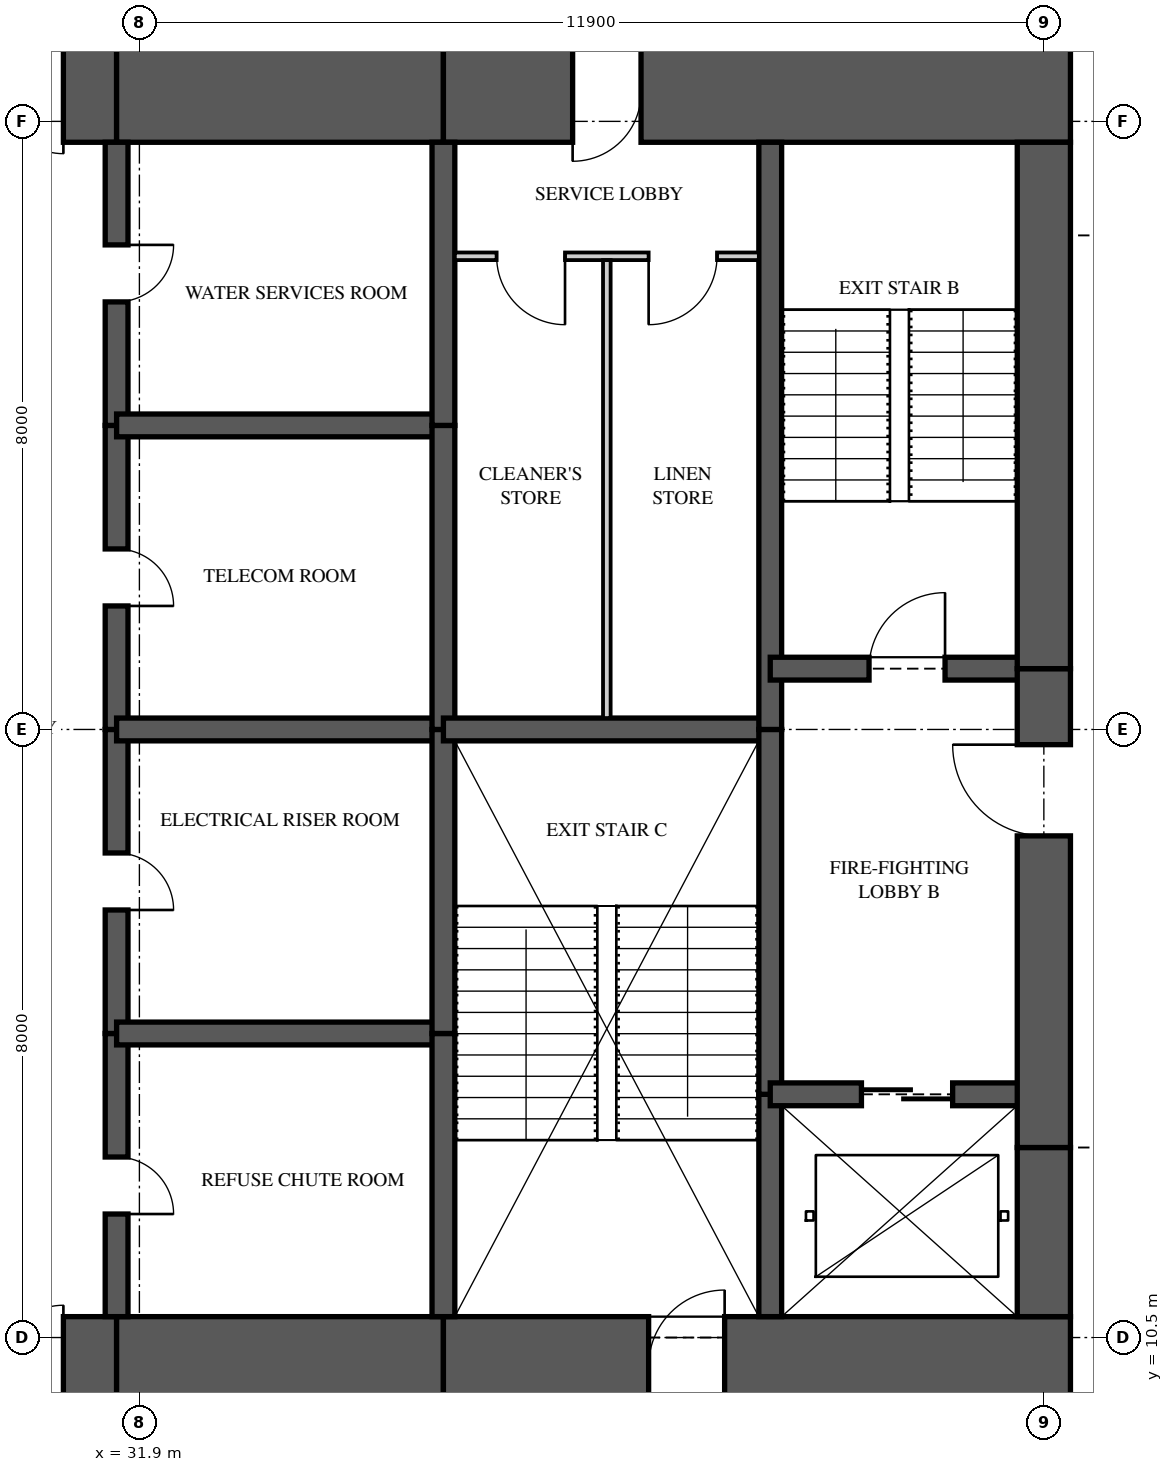
"""IFC4 building model, lengths in metres.
Left out: names, types, materials, properties, quantities, classifications, styles, units other than length and angle.
Written with IfcOpenShell. Run it as: python <this file> out.ifc"""

import sys

from ifc_helpers import new_model, si_unit, direction, frame, frame_2d, origin, place, context, subcontext, project, spatial, rectangle, extrude, element, fill, save


model = new_model("IFC4")
c1 = context("Model", 3, precision=1e-05, world=origin(), true_north=direction((0.0, 1.0)))
c2 = subcontext(c1, "Body", "Model", "MODEL_VIEW")
j1 = project(units=[si_unit("LENGTHUNIT", "METRE"), si_unit("PLANEANGLEUNIT", "RADIAN")], contexts=[c1])
p1 = place(None, origin())
s1 = spatial("IfcSite", under=j1, at=p1, CompositionType="ELEMENT")
p2 = place(p1, origin())
s2 = spatial("IfcBuilding", under=s1, at=p2, CompositionType="ELEMENT")
p3 = place(p2, frame((0.0, 0.0, 181.15)))
s3 = spatial("IfcBuildingStorey", under=s2, at=p3, CompositionType="ELEMENT", Elevation=181.15)
p4 = place(p3, frame((26.0, 10.125, 0.0), z_axis=(0.0, 0.0, 1.0), x_axis=(1.0, 0.0, 0.0)))
e1 = element("IfcWall", 1, at=p4, inside=s3, PredefinedType="SHEAR", context=c2, shape_type="SweptSolid", body=[
    extrude(rectangle(XDim=5.6, YDim=1.3, at=frame_2d((2.8, 0.0))), origin(), (0.0, 0.0, 1.0), 3.35),
])
p5 = place(p4, frame((3.3, 0.0, 0.0)))
e2 = element("IfcOpeningElement", 2, at=p5, cuts=e1, PredefinedType="OPENING", context=c2, shape_type="SweptSolid", body=[
    extrude(rectangle(XDim=1.6, YDim=2.1, at=frame_2d((0.8, 1.05))), frame((0.0, 0.66, 0.0), z_axis=(0.0, -1.0, 0.0), x_axis=(1.0, 0.0, 0.0)), (0.0, 0.0, 1.0), 1.32),
])
p6 = place(p3, frame((31.6, 10.125, 0.0), z_axis=(0.0, 0.0, 1.0), x_axis=(1.0, 0.0, 0.0)))
e3 = element("IfcWall", 3, at=p6, inside=s3, PredefinedType="SHEAR", context=c2, shape_type="SweptSolid", body=[
    extrude(rectangle(XDim=4.3, YDim=1.3, at=frame_2d((2.15, 0.0))), origin(), (0.0, 0.0, 1.0), 3.35),
])
p7 = place(p3, frame((35.9, 10.125, 0.0), z_axis=(0.0, 0.0, 1.0), x_axis=(1.0, 0.0, 0.0)))
e4 = element("IfcWall", 4, at=p7, inside=s3, PredefinedType="SHEAR", context=c2, shape_type="SweptSolid", body=[
    extrude(rectangle(XDim=8.25, YDim=1.3, at=frame_2d((4.125, 0.0))), origin(), (0.0, 0.0, 1.0), 3.35),
])
p8 = place(p7, frame((2.7, 0.0, 0.0)))
e5 = element("IfcOpeningElement", 5, at=p8, cuts=e4, PredefinedType="OPENING", context=c2, shape_type="SweptSolid", body=[
    extrude(rectangle(XDim=1.0, YDim=2.1, at=frame_2d((0.5, 1.05))), frame((0.0, 0.66, 0.0), z_axis=(0.0, -1.0, 0.0), x_axis=(1.0, 0.0, 0.0)), (0.0, 0.0, 1.0), 1.32),
])
p9 = place(p3, frame((44.15, 26.875, 0.0), z_axis=(0.0, 0.0, 1.0), x_axis=(-1.0, 0.0, 0.0)))
e6 = element("IfcWall", 6, at=p9, inside=s3, PredefinedType="SHEAR", context=c2, shape_type="SweptSolid", body=[
    extrude(rectangle(XDim=8.25, YDim=1.3, at=frame_2d((4.125, 0.0))), origin(), (0.0, 0.0, 1.0), 3.35),
])
p10 = place(p9, frame((5.65, 0.0, 0.0)))
e7 = element("IfcOpeningElement", 7, at=p10, cuts=e6, PredefinedType="OPENING", context=c2, shape_type="SweptSolid", body=[
    extrude(rectangle(XDim=0.9, YDim=2.1, at=frame_2d((0.45, 1.05))), frame((0.0, 0.66, 0.0), z_axis=(0.0, -1.0, 0.0), x_axis=(1.0, 0.0, 0.0)), (0.0, 0.0, 1.0), 1.32),
])
p11 = place(p3, frame((35.9, 26.875, 0.0), z_axis=(0.0, 0.0, 1.0), x_axis=(-1.0, 0.0, 0.0)))
e8 = element("IfcWall", 8, at=p11, inside=s3, PredefinedType="SHEAR", context=c2, shape_type="SweptSolid", body=[
    extrude(rectangle(XDim=4.3, YDim=1.3, at=frame_2d((2.15, 0.0))), origin(), (0.0, 0.0, 1.0), 3.35),
])
p12 = place(p3, frame((31.6, 26.875, 0.0), z_axis=(0.0, 0.0, 1.0), x_axis=(-1.0, 0.0, 0.0)))
e9 = element("IfcWall", 9, at=p12, inside=s3, PredefinedType="SHEAR", context=c2, shape_type="SweptSolid", body=[
    extrude(rectangle(XDim=5.6, YDim=1.3, at=frame_2d((2.8, 0.0))), origin(), (0.0, 0.0, 1.0), 3.35),
])
p13 = place(p12, frame((0.7, 0.0, 0.0)))
e10 = element("IfcOpeningElement", 10, at=p13, cuts=e9, PredefinedType="OPENING", context=c2, shape_type="SweptSolid", body=[
    extrude(rectangle(XDim=1.6, YDim=2.1, at=frame_2d((0.8, 1.05))), frame((0.0, 0.66, 0.0), z_axis=(0.0, -1.0, 0.0), x_axis=(1.0, 0.0, 0.0)), (0.0, 0.0, 1.0), 1.32),
])
p14 = place(p3, frame((43.8, 10.775, 0.0), z_axis=(0.0, 0.0, 1.0), x_axis=(0.0, 1.0, 0.0)))
e11 = element("IfcWall", 11, at=p14, inside=s3, PredefinedType="SHEAR", context=c2, shape_type="SweptSolid", body=[
    extrude(rectangle(XDim=2.225, YDim=0.7, at=frame_2d((1.113, 0.0))), origin(), (0.0, 0.0, 1.0), 3.35),
])
p15 = place(p3, frame((43.8, 13.0, 0.0), z_axis=(0.0, 0.0, 1.0), x_axis=(0.0, 1.0, 0.0)))
e12 = element("IfcWall", 12, at=p15, inside=s3, PredefinedType="SHEAR", context=c2, shape_type="SweptSolid", body=[
    extrude(rectangle(XDim=6.3, YDim=0.7, at=frame_2d((3.15, 0.0))), origin(), (0.0, 0.0, 1.0), 3.35),
])
p16 = place(p15, frame((4.1, 0.0, 0.0)))
e13 = element("IfcOpeningElement", 13, at=p16, cuts=e12, PredefinedType="OPENING", context=c2, shape_type="SweptSolid", body=[
    extrude(rectangle(XDim=1.2, YDim=2.2, at=frame_2d((0.6, 1.1))), frame((0.0, 0.36, 0.0), z_axis=(0.0, -1.0, 0.0), x_axis=(1.0, 0.0, 0.0)), (0.0, 0.0, 1.0), 0.72),
])
p17 = place(p3, frame((43.8, 19.3, 0.0), z_axis=(0.0, 0.0, 1.0), x_axis=(0.0, 1.0, 0.0)))
e14 = element("IfcWall", 14, at=p17, inside=s3, PredefinedType="SHEAR", context=c2, shape_type="SweptSolid", body=[
    extrude(rectangle(XDim=6.925, YDim=0.7, at=frame_2d((3.462, 0.0))), origin(), (0.0, 0.0, 1.0), 3.35),
])
p18 = place(p3, frame((31.6, 10.775, 0.0), z_axis=(0.0, 0.0, 1.0), x_axis=(0.0, 1.0, 0.0)))
e15 = element("IfcWall", 15, at=p18, inside=s3, PredefinedType="SHEAR", context=c2, shape_type="SweptSolid", body=[
    extrude(rectangle(XDim=3.725, YDim=0.3, at=frame_2d((1.863, 0.0))), origin(), (0.0, 0.0, 1.0), 3.35),
])
p19 = place(p18, frame((1.35, 0.0, 0.0)))
e16 = element("IfcOpeningElement", 16, at=p19, cuts=e15, PredefinedType="OPENING", context=c2, shape_type="SweptSolid", body=[
    extrude(rectangle(XDim=0.75, YDim=2.1, at=frame_2d((0.375, 1.05))), frame((0.0, 0.16, 0.0), z_axis=(0.0, -1.0, 0.0), x_axis=(1.0, 0.0, 0.0)), (0.0, 0.0, 1.0), 0.32),
])
p20 = place(p3, frame((31.6, 14.5, 0.0), z_axis=(0.0, 0.0, 1.0), x_axis=(0.0, 1.0, 0.0)))
e17 = element("IfcWall", 17, at=p20, inside=s3, PredefinedType="SHEAR", context=c2, shape_type="SweptSolid", body=[
    extrude(rectangle(XDim=4.0, YDim=0.3, at=frame_2d((2.0, 0.0))), origin(), (0.0, 0.0, 1.0), 3.35),
])
p21 = place(p20, frame((1.625, 0.0, 0.0)))
e18 = element("IfcOpeningElement", 18, at=p21, cuts=e17, PredefinedType="OPENING", context=c2, shape_type="SweptSolid", body=[
    extrude(rectangle(XDim=0.75, YDim=2.1, at=frame_2d((0.375, 1.05))), frame((0.0, 0.16, 0.0), z_axis=(0.0, -1.0, 0.0), x_axis=(1.0, 0.0, 0.0)), (0.0, 0.0, 1.0), 0.32),
])
p22 = place(p3, frame((31.6, 18.5, 0.0), z_axis=(0.0, 0.0, 1.0), x_axis=(0.0, 1.0, 0.0)))
e19 = element("IfcWall", 19, at=p22, inside=s3, PredefinedType="SHEAR", context=c2, shape_type="SweptSolid", body=[
    extrude(rectangle(XDim=4.0, YDim=0.3, at=frame_2d((2.0, 0.0))), origin(), (0.0, 0.0, 1.0), 3.35),
])
p23 = place(p22, frame((1.625, 0.0, 0.0)))
e20 = element("IfcOpeningElement", 20, at=p23, cuts=e19, PredefinedType="OPENING", context=c2, shape_type="SweptSolid", body=[
    extrude(rectangle(XDim=0.75, YDim=2.1, at=frame_2d((0.375, 1.05))), frame((0.0, 0.16, 0.0), z_axis=(0.0, -1.0, 0.0), x_axis=(1.0, 0.0, 0.0)), (0.0, 0.0, 1.0), 0.32),
])
p24 = place(p3, frame((31.6, 22.5, 0.0), z_axis=(0.0, 0.0, 1.0), x_axis=(0.0, 1.0, 0.0)))
e21 = element("IfcWall", 21, at=p24, inside=s3, PredefinedType="SHEAR", context=c2, shape_type="SweptSolid", body=[
    extrude(rectangle(XDim=3.725, YDim=0.3, at=frame_2d((1.863, 0.0))), origin(), (0.0, 0.0, 1.0), 3.35),
])
p25 = place(p24, frame((1.625, 0.0, 0.0)))
e22 = element("IfcOpeningElement", 22, at=p25, cuts=e21, PredefinedType="OPENING", context=c2, shape_type="SweptSolid", body=[
    extrude(rectangle(XDim=0.75, YDim=2.1, at=frame_2d((0.375, 1.05))), frame((0.0, 0.16, 0.0), z_axis=(0.0, -1.0, 0.0), x_axis=(1.0, 0.0, 0.0)), (0.0, 0.0, 1.0), 0.32),
])
p26 = place(p3, frame((35.9, 10.775, 0.0), z_axis=(0.0, 0.0, 1.0), x_axis=(0.0, 1.0, 0.0)))
e23 = element("IfcWall", 23, at=p26, inside=s3, PredefinedType="SHEAR", context=c2, shape_type="SweptSolid", body=[
    extrude(rectangle(XDim=3.725, YDim=0.3, at=frame_2d((1.863, 0.0))), origin(), (0.0, 0.0, 1.0), 3.35),
])
for number, where, z_axis, x_axis in (
    (24, (35.9, 14.5, 0.0), (0.0, 0.0, 1.0), (0.0, 1.0, 0.0)),
    (25, (35.9, 18.5, 0.0), (0.0, 0.0, 1.0), (0.0, 1.0, 0.0)),
):
    element("IfcWall", number, at=place(p3, frame(where, z_axis=z_axis, x_axis=x_axis)), inside=s3, PredefinedType="SHEAR", context=c2, shape_type="SweptSolid", body=[
        extrude(rectangle(XDim=4.0, YDim=0.3, at=frame_2d((2.0, 0.0))), origin(), (0.0, 0.0, 1.0), 3.35),
    ])
p27 = place(p3, frame((35.9, 22.5, 0.0), z_axis=(0.0, 0.0, 1.0), x_axis=(0.0, 1.0, 0.0)))
e26 = element("IfcWall", 26, at=p27, inside=s3, PredefinedType="SHEAR", context=c2, shape_type="SweptSolid", body=[
    extrude(rectangle(XDim=3.725, YDim=0.3, at=frame_2d((1.863, 0.0))), origin(), (0.0, 0.0, 1.0), 3.35),
])
p28 = place(p3, frame((40.2, 10.775, 0.0), z_axis=(0.0, 0.0, 1.0), x_axis=(0.0, 1.0, 0.0)))
e27 = element("IfcWall", 27, at=p28, inside=s3, PredefinedType="SHEAR", context=c2, shape_type="SweptSolid", body=[
    extrude(rectangle(XDim=2.925, YDim=0.3, at=frame_2d((1.462, 0.0))), origin(), (0.0, 0.0, 1.0), 3.35),
])
p29 = place(p3, frame((40.2, 13.7, 0.0), z_axis=(0.0, 0.0, 1.0), x_axis=(0.0, 1.0, 0.0)))
e28 = element("IfcWall", 28, at=p29, inside=s3, PredefinedType="SHEAR", context=c2, shape_type="SweptSolid", body=[
    extrude(rectangle(XDim=4.8, YDim=0.3, at=frame_2d((2.4, 0.0))), origin(), (0.0, 0.0, 1.0), 3.35),
])
p30 = place(p3, frame((40.2, 18.5, 0.0), z_axis=(0.0, 0.0, 1.0), x_axis=(0.0, 1.0, 0.0)))
e29 = element("IfcWall", 29, at=p30, inside=s3, PredefinedType="SHEAR", context=c2, shape_type="SweptSolid", body=[
    extrude(rectangle(XDim=7.725, YDim=0.3, at=frame_2d((3.863, 0.0))), origin(), (0.0, 0.0, 1.0), 3.35),
])
for number, where, z_axis, x_axis in (
    (30, (31.6, 14.5, 0.0), (0.0, 0.0, 1.0), (1.0, 0.0, 0.0)),
    (31, (31.6, 18.5, 0.0), (0.0, 0.0, 1.0), (1.0, 0.0, 0.0)),
    (32, (31.6, 22.5, 0.0), (0.0, 0.0, 1.0), (1.0, 0.0, 0.0)),
):
    element("IfcWall", number, at=place(p3, frame(where, z_axis=z_axis, x_axis=x_axis)), inside=s3, PredefinedType="SHEAR", context=c2, shape_type="SweptSolid", body=[
        extrude(rectangle(XDim=4.3, YDim=0.3, at=frame_2d((2.15, 0.0))), origin(), (0.0, 0.0, 1.0), 3.35),
    ])
p31 = place(p3, frame((35.9, 18.5, 0.0), z_axis=(0.0, 0.0, 1.0), x_axis=(1.0, 0.0, 0.0)))
e33 = element("IfcWall", 33, at=p31, inside=s3, PredefinedType="SHEAR", context=c2, shape_type="SweptSolid", body=[
    extrude(rectangle(XDim=4.3, YDim=0.3, at=frame_2d((2.15, 0.0))), origin(), (0.0, 0.0, 1.0), 3.35),
])
p32 = place(p3, frame((40.2, 13.7, 0.0), z_axis=(0.0, 0.0, 1.0), x_axis=(1.0, 0.0, 0.0)))
e34 = element("IfcWall", 34, at=p32, inside=s3, PredefinedType="SHEAR", context=c2, shape_type="SweptSolid", body=[
    extrude(rectangle(XDim=3.6, YDim=0.3, at=frame_2d((1.8, 0.0))), origin(), (0.0, 0.0, 1.0), 3.35),
])
p33 = place(p32, frame((1.2, 0.0, 0.0)))
e35 = element("IfcOpeningElement", 35, at=p33, cuts=e34, PredefinedType="OPENING", context=c2, shape_type="SweptSolid", body=[
    extrude(rectangle(XDim=1.2, YDim=2.1, at=frame_2d((0.6, 1.05))), frame((0.0, 0.16, 0.0), z_axis=(0.0, -1.0, 0.0), x_axis=(1.0, 0.0, 0.0)), (0.0, 0.0, 1.0), 0.32),
])
p34 = place(p3, frame((40.2, 19.3, 0.0), z_axis=(0.0, 0.0, 1.0), x_axis=(1.0, 0.0, 0.0)))
e36 = element("IfcWall", 36, at=p34, inside=s3, PredefinedType="SHEAR", context=c2, shape_type="SweptSolid", body=[
    extrude(rectangle(XDim=3.6, YDim=0.3, at=frame_2d((1.8, 0.0))), origin(), (0.0, 0.0, 1.0), 3.35),
])
p35 = place(p34, frame((1.3, 0.0, 0.0)))
e37 = element("IfcOpeningElement", 37, at=p35, cuts=e36, PredefinedType="OPENING", context=c2, shape_type="SweptSolid", body=[
    extrude(rectangle(XDim=1.0, YDim=2.1, at=frame_2d((0.5, 1.05))), frame((0.0, 0.16, 0.0), z_axis=(0.0, -1.0, 0.0), x_axis=(1.0, 0.0, 0.0)), (0.0, 0.0, 1.0), 0.32),
])
p36 = place(p3, frame((36.05, 24.725, 0.0), z_axis=(0.0, 0.0, 1.0), x_axis=(1.0, 0.0, 0.0)))
e38 = element("IfcWall", 38, at=p36, inside=s3, PredefinedType="PARTITIONING", context=c2, shape_type="SweptSolid", body=[
    extrude(rectangle(XDim=4.0, YDim=0.1, at=frame_2d((2.0, 0.0))), origin(), (0.0, 0.0, 1.0), 3.11),
])
p37 = place(p36, frame((0.55, 0.0, 0.0)))
e39 = element("IfcOpeningElement", 39, at=p37, cuts=e38, PredefinedType="OPENING", context=c2, shape_type="SweptSolid", body=[
    extrude(rectangle(XDim=0.9, YDim=2.1, at=frame_2d((0.45, 1.05))), frame((0.0, 0.06, 0.0), z_axis=(0.0, -1.0, 0.0), x_axis=(1.0, 0.0, 0.0)), (0.0, 0.0, 1.0), 0.12),
])
p38 = place(p36, frame((2.55, 0.0, 0.0)))
e40 = element("IfcOpeningElement", 40, at=p38, cuts=e38, PredefinedType="OPENING", context=c2, shape_type="SweptSolid", body=[
    extrude(rectangle(XDim=0.9, YDim=2.1, at=frame_2d((0.45, 1.05))), frame((0.0, 0.06, 0.0), z_axis=(0.0, -1.0, 0.0), x_axis=(1.0, 0.0, 0.0)), (0.0, 0.0, 1.0), 0.12),
])
p39 = place(p3, frame((38.05, 18.65, 0.0), z_axis=(0.0, 0.0, 1.0), x_axis=(0.0, 1.0, 0.0)))
e41 = element("IfcWall", 41, at=p39, inside=s3, PredefinedType="PARTITIONING", context=c2, shape_type="SweptSolid", body=[
    extrude(rectangle(XDim=6.025, YDim=0.1, at=frame_2d((3.013, 0.0))), origin(), (0.0, 0.0, 1.0), 3.11),
])
p40 = place(p37, frame((0.9, 0.0, 0.0), z_axis=(0.0, 0.0, 1.0), x_axis=(-1.0, 0.0, 0.0)))
e42 = element("IfcDoor", 42, at=p40, inside=s3, OperationType="SINGLE_SWING_LEFT", PredefinedType="DOOR", context=c2, shape_type="SweptSolid", body=[
    extrude(rectangle(XDim=0.9, YDim=2.1, at=frame_2d((0.45, 1.05))), frame((0.0, 0.025, 0.0), z_axis=(0.0, -1.0, 0.0), x_axis=(1.0, 0.0, 0.0)), (0.0, 0.0, 1.0), 0.05),
])
fill(e39, e42)
p41 = place(p38, frame((0.9, 0.0, 0.0), z_axis=(0.0, 0.0, 1.0), x_axis=(-1.0, 0.0, 0.0)))
e43 = element("IfcDoor", 43, at=p41, inside=s3, OperationType="SINGLE_SWING_RIGHT", PredefinedType="DOOR", context=c2, shape_type="SweptSolid", body=[
    extrude(rectangle(XDim=0.9, YDim=2.1, at=frame_2d((0.45, 1.05))), frame((0.0, 0.025, 0.0), z_axis=(0.0, -1.0, 0.0), x_axis=(1.0, 0.0, 0.0)), (0.0, 0.0, 1.0), 0.05),
])
fill(e40, e43)
p42 = place(p35, origin())
e44 = element("IfcDoor", 44, at=p42, inside=s3, OperationType="SINGLE_SWING_RIGHT", PredefinedType="DOOR", context=c2, shape_type="SweptSolid", body=[
    extrude(rectangle(XDim=1.0, YDim=2.1, at=frame_2d((0.5, 1.05))), frame((0.0, 0.025, 0.0), z_axis=(0.0, -1.0, 0.0), x_axis=(1.0, 0.0, 0.0)), (0.0, 0.0, 1.0), 0.05),
])
fill(e37, e44)
p43 = place(p16, origin())
e45 = element("IfcDoor", 45, at=p43, inside=s3, OperationType="SINGLE_SWING_RIGHT", PredefinedType="DOOR", context=c2, shape_type="SweptSolid", body=[
    extrude(rectangle(XDim=1.2, YDim=2.2, at=frame_2d((0.6, 1.1))), frame((0.0, 0.025, 0.0), z_axis=(0.0, -1.0, 0.0), x_axis=(1.0, 0.0, 0.0)), (0.0, 0.0, 1.0), 0.05),
])
fill(e13, e45)
p44 = place(p33, origin())
e46 = element("IfcDoor", 46, at=p44, inside=s3, OperationType="SLIDING_TO_LEFT", PredefinedType="DOOR", context=c2, shape_type="SweptSolid", body=[
    extrude(rectangle(XDim=1.2, YDim=2.1, at=frame_2d((0.6, 1.05))), frame((0.0, 0.025, 0.0), z_axis=(0.0, -1.0, 0.0), x_axis=(1.0, 0.0, 0.0)), (0.0, 0.0, 1.0), 0.05),
])
fill(e35, e46)
p45 = place(p5, origin())
e47 = element("IfcDoor", 47, at=p45, inside=s3, OperationType="DOUBLE_DOOR_SINGLE_SWING", PredefinedType="DOOR", context=c2, shape_type="SweptSolid", body=[
    extrude(rectangle(XDim=1.6, YDim=2.1, at=frame_2d((0.8, 1.05))), frame((0.0, 0.025, 0.0), z_axis=(0.0, -1.0, 0.0), x_axis=(1.0, 0.0, 0.0)), (0.0, 0.0, 1.0), 0.05),
])
fill(e2, e47)
p46 = place(p13, origin())
e48 = element("IfcDoor", 48, at=p46, inside=s3, OperationType="DOUBLE_DOOR_SINGLE_SWING", PredefinedType="DOOR", context=c2, shape_type="SweptSolid", body=[
    extrude(rectangle(XDim=1.6, YDim=2.1, at=frame_2d((0.8, 1.05))), frame((0.0, 0.025, 0.0), z_axis=(0.0, -1.0, 0.0), x_axis=(1.0, 0.0, 0.0)), (0.0, 0.0, 1.0), 0.05),
])
fill(e10, e48)
p47 = place(p19, frame((0.75, 0.0, 0.0), z_axis=(0.0, 0.0, 1.0), x_axis=(-1.0, 0.0, 0.0)))
e49 = element("IfcDoor", 49, at=p47, inside=s3, OperationType="SINGLE_SWING_RIGHT", PredefinedType="DOOR", context=c2, shape_type="SweptSolid", body=[
    extrude(rectangle(XDim=0.75, YDim=2.1, at=frame_2d((0.375, 1.05))), frame((0.0, 0.025, 0.0), z_axis=(0.0, -1.0, 0.0), x_axis=(1.0, 0.0, 0.0)), (0.0, 0.0, 1.0), 0.05),
])
fill(e16, e49)
p48 = place(p21, frame((0.75, 0.0, 0.0), z_axis=(0.0, 0.0, 1.0), x_axis=(-1.0, 0.0, 0.0)))
e50 = element("IfcDoor", 50, at=p48, inside=s3, OperationType="SINGLE_SWING_RIGHT", PredefinedType="DOOR", context=c2, shape_type="SweptSolid", body=[
    extrude(rectangle(XDim=0.75, YDim=2.1, at=frame_2d((0.375, 1.05))), frame((0.0, 0.025, 0.0), z_axis=(0.0, -1.0, 0.0), x_axis=(1.0, 0.0, 0.0)), (0.0, 0.0, 1.0), 0.05),
])
fill(e18, e50)
p49 = place(p23, frame((0.75, 0.0, 0.0), z_axis=(0.0, 0.0, 1.0), x_axis=(-1.0, 0.0, 0.0)))
e51 = element("IfcDoor", 51, at=p49, inside=s3, OperationType="SINGLE_SWING_RIGHT", PredefinedType="DOOR", context=c2, shape_type="SweptSolid", body=[
    extrude(rectangle(XDim=0.75, YDim=2.1, at=frame_2d((0.375, 1.05))), frame((0.0, 0.025, 0.0), z_axis=(0.0, -1.0, 0.0), x_axis=(1.0, 0.0, 0.0)), (0.0, 0.0, 1.0), 0.05),
])
fill(e20, e51)
p50 = place(p25, frame((0.75, 0.0, 0.0), z_axis=(0.0, 0.0, 1.0), x_axis=(-1.0, 0.0, 0.0)))
e52 = element("IfcDoor", 52, at=p50, inside=s3, OperationType="SINGLE_SWING_LEFT", PredefinedType="DOOR", context=c2, shape_type="SweptSolid", body=[
    extrude(rectangle(XDim=0.75, YDim=2.1, at=frame_2d((0.375, 1.05))), frame((0.0, 0.025, 0.0), z_axis=(0.0, -1.0, 0.0), x_axis=(1.0, 0.0, 0.0)), (0.0, 0.0, 1.0), 0.05),
])
fill(e22, e52)
p51 = place(p8, origin())
e53 = element("IfcDoor", 53, at=p51, inside=s3, OperationType="SINGLE_SWING_RIGHT", PredefinedType="DOOR", context=c2, shape_type="SweptSolid", body=[
    extrude(rectangle(XDim=1.0, YDim=2.1, at=frame_2d((0.5, 1.05))), frame((0.0, 0.025, 0.0), z_axis=(0.0, -1.0, 0.0), x_axis=(1.0, 0.0, 0.0)), (0.0, 0.0, 1.0), 0.05),
])
fill(e5, e53)
p52 = place(p10, origin())
e54 = element("IfcDoor", 54, at=p52, inside=s3, OperationType="SINGLE_SWING_RIGHT", PredefinedType="DOOR", context=c2, shape_type="SweptSolid", body=[
    extrude(rectangle(XDim=0.9, YDim=2.1, at=frame_2d((0.45, 1.05))), frame((0.0, 0.47, 0.0), z_axis=(0.0, -1.0, 0.0), x_axis=(1.0, 0.0, 0.0)), (0.0, 0.0, 1.0), 0.8),
])
fill(e7, e54)
save(model, sys.argv[1])
